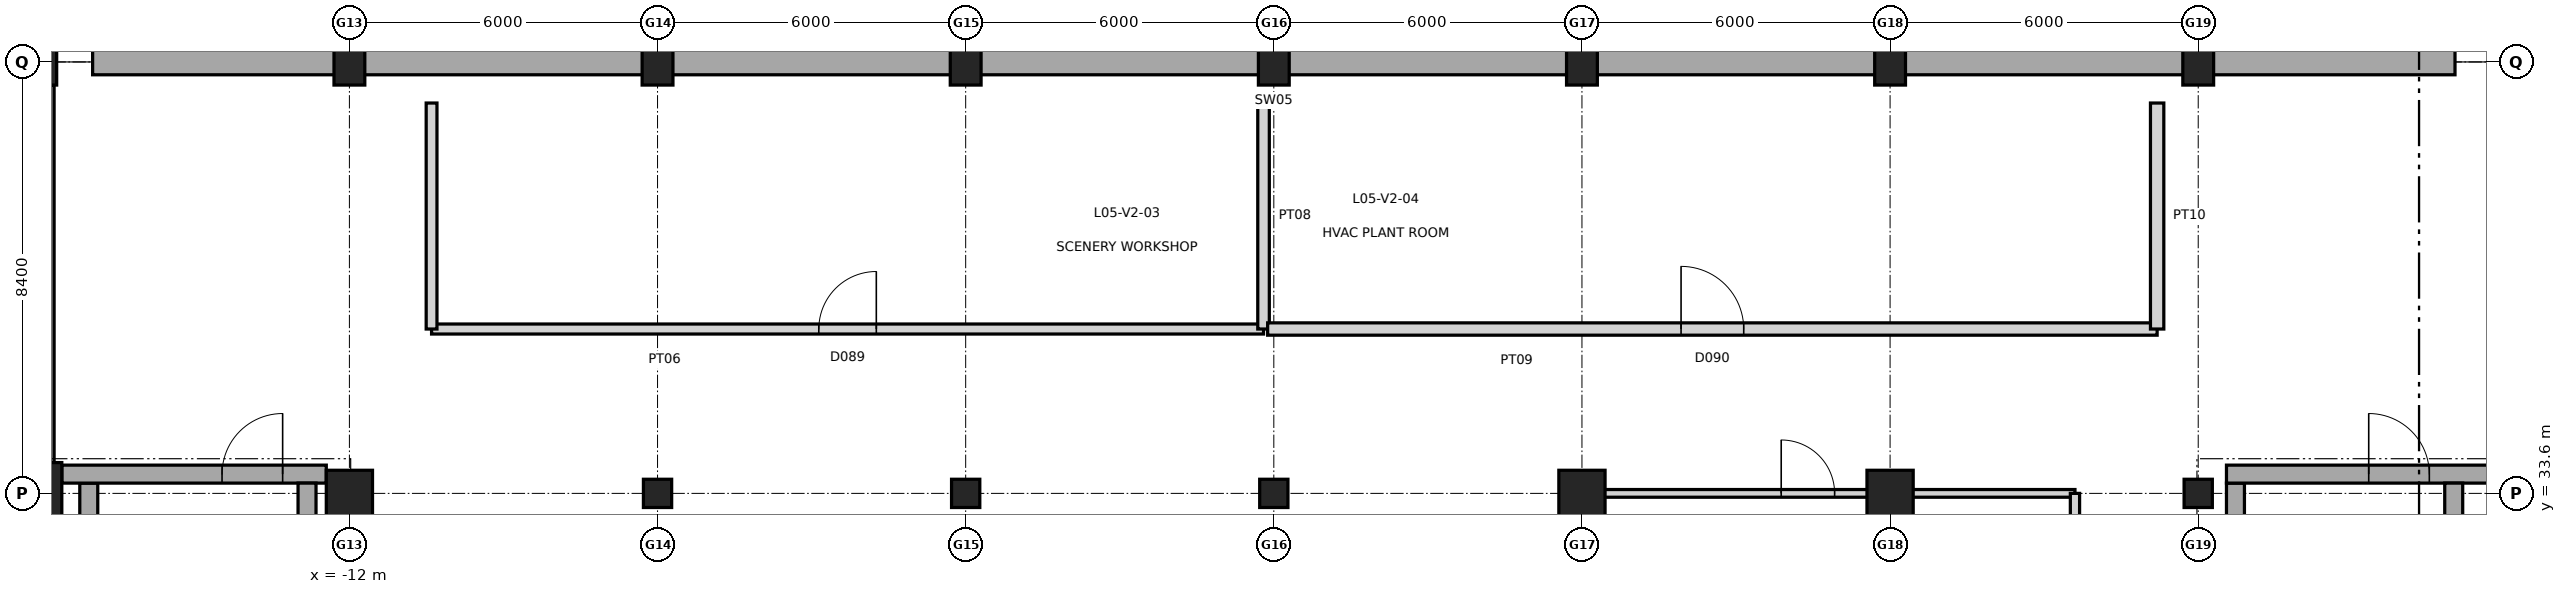
"""IFC4 building model, lengths in metres.
Left out: names, types, materials, properties, quantities, classifications, styles, units other than length and angle.
Written with IfcOpenShell. Run it as: python <this file> out.ifc"""

import sys

from ifc_helpers import new_model, si_unit, direction, frame, frame_2d, origin, origin_2d, place, context, subcontext, project, spatial, rectangle, extrude, element, fill, save


model = new_model("IFC4")
c1 = context("Model", 3, precision=1e-05, world=origin(), true_north=direction((0.0, 1.0)))
c2 = subcontext(c1, "Body", "Model", "MODEL_VIEW")
j1 = project(units=[si_unit("LENGTHUNIT", "METRE"), si_unit("PLANEANGLEUNIT", "RADIAN")], contexts=[c1])
p1 = place(None, origin())
s1 = spatial("IfcSite", under=j1, at=p1, CompositionType="ELEMENT")
p2 = place(p1, origin())
s2 = spatial("IfcBuilding", under=s1, at=p2, CompositionType="ELEMENT")
p3 = place(p2, frame((0.0, 0.0, 24.6)))
s3 = spatial("IfcBuildingStorey", under=s2, at=p3, CompositionType="ELEMENT", Elevation=24.6)
p4 = place(p3, frame((-18.0, 33.6, 0.0), z_axis=(0.0, 0.0, 1.0), x_axis=(1.0, 0.0, 0.0)))
e1 = element("IfcColumn", 1, at=p4, inside=s3, PredefinedType="COLUMN", context=c2, shape_type="SweptSolid", body=[
    extrude(rectangle(XDim=0.8, YDim=1.2, at=origin_2d()), origin(), (0.0, 0.0, 1.0), 5.4),
])
p5 = place(p3, frame((-18.0, 42.0, 0.0), z_axis=(0.0, 0.0, 1.0), x_axis=(1.0, 0.0, 0.0)))
e2 = element("IfcColumn", 2, at=p5, inside=s3, PredefinedType="COLUMN", context=c2, shape_type="SweptSolid", body=[
    extrude(rectangle(XDim=0.6, YDim=0.9, at=origin_2d()), origin(), (0.0, 0.0, 1.0), 5.4),
])
p6 = place(p3, frame((-12.0, 33.6, 0.0), z_axis=(0.0, 0.0, 1.0), x_axis=(1.0, 0.0, 0.0)))
e3 = element("IfcColumn", 3, at=p6, inside=s3, PredefinedType="COLUMN", context=c2, shape_type="SweptSolid", body=[
    extrude(rectangle(XDim=0.9, YDim=0.9, at=origin_2d()), origin(), (0.0, 0.0, 1.0), 5.4),
])
p7 = place(p3, frame((-12.0, 42.0, 0.0), z_axis=(0.0, 0.0, 1.0), x_axis=(1.0, 0.0, 0.0)))
e4 = element("IfcColumn", 4, at=p7, inside=s3, PredefinedType="COLUMN", context=c2, shape_type="SweptSolid", body=[
    extrude(rectangle(XDim=0.6, YDim=0.9, at=origin_2d()), origin(), (0.0, 0.0, 1.0), 5.4),
])
p8 = place(p3, frame((-6.0, 33.6, 0.0), z_axis=(0.0, 0.0, 1.0), x_axis=(1.0, 0.0, 0.0)))
e5 = element("IfcColumn", 5, at=p8, inside=s3, PredefinedType="COLUMN", context=c2, shape_type="SweptSolid", body=[
    extrude(rectangle(XDim=0.55, YDim=0.55, at=origin_2d()), origin(), (0.0, 0.0, 1.0), 5.4),
])
p9 = place(p3, frame((-6.0, 42.0, 0.0), z_axis=(0.0, 0.0, 1.0), x_axis=(1.0, 0.0, 0.0)))
e6 = element("IfcColumn", 6, at=p9, inside=s3, PredefinedType="COLUMN", context=c2, shape_type="SweptSolid", body=[
    extrude(rectangle(XDim=0.6, YDim=0.9, at=origin_2d()), origin(), (0.0, 0.0, 1.0), 5.4),
])
p10 = place(p3, frame((0.0, 33.6, 0.0), z_axis=(0.0, 0.0, 1.0), x_axis=(1.0, 0.0, 0.0)))
e7 = element("IfcColumn", 7, at=p10, inside=s3, PredefinedType="COLUMN", context=c2, shape_type="SweptSolid", body=[
    extrude(rectangle(XDim=0.55, YDim=0.55, at=origin_2d()), origin(), (0.0, 0.0, 1.0), 5.4),
])
p11 = place(p3, frame((0.0, 42.0, 0.0), z_axis=(0.0, 0.0, 1.0), x_axis=(1.0, 0.0, 0.0)))
e8 = element("IfcColumn", 8, at=p11, inside=s3, PredefinedType="COLUMN", context=c2, shape_type="SweptSolid", body=[
    extrude(rectangle(XDim=0.6, YDim=0.9, at=origin_2d()), origin(), (0.0, 0.0, 1.0), 5.4),
])
p12 = place(p3, frame((6.0, 33.6, 0.0), z_axis=(0.0, 0.0, 1.0), x_axis=(1.0, 0.0, 0.0)))
e9 = element("IfcColumn", 9, at=p12, inside=s3, PredefinedType="COLUMN", context=c2, shape_type="SweptSolid", body=[
    extrude(rectangle(XDim=0.55, YDim=0.55, at=origin_2d()), origin(), (0.0, 0.0, 1.0), 5.4),
])
p13 = place(p3, frame((6.0, 42.0, 0.0), z_axis=(0.0, 0.0, 1.0), x_axis=(1.0, 0.0, 0.0)))
e10 = element("IfcColumn", 10, at=p13, inside=s3, PredefinedType="COLUMN", context=c2, shape_type="SweptSolid", body=[
    extrude(rectangle(XDim=0.6, YDim=0.9, at=origin_2d()), origin(), (0.0, 0.0, 1.0), 5.4),
])
p14 = place(p3, frame((12.0, 33.6, 0.0), z_axis=(0.0, 0.0, 1.0), x_axis=(1.0, 0.0, 0.0)))
e11 = element("IfcColumn", 11, at=p14, inside=s3, PredefinedType="COLUMN", context=c2, shape_type="SweptSolid", body=[
    extrude(rectangle(XDim=0.9, YDim=0.9, at=origin_2d()), origin(), (0.0, 0.0, 1.0), 5.4),
])
p15 = place(p3, frame((12.0, 42.0, 0.0), z_axis=(0.0, 0.0, 1.0), x_axis=(1.0, 0.0, 0.0)))
e12 = element("IfcColumn", 12, at=p15, inside=s3, PredefinedType="COLUMN", context=c2, shape_type="SweptSolid", body=[
    extrude(rectangle(XDim=0.6, YDim=0.9, at=origin_2d()), origin(), (0.0, 0.0, 1.0), 5.4),
])
p16 = place(p3, frame((18.0, 33.6, 0.0), z_axis=(0.0, 0.0, 1.0), x_axis=(1.0, 0.0, 0.0)))
e13 = element("IfcColumn", 13, at=p16, inside=s3, PredefinedType="COLUMN", context=c2, shape_type="SweptSolid", body=[
    extrude(rectangle(XDim=0.9, YDim=0.9, at=origin_2d()), origin(), (0.0, 0.0, 1.0), 5.4),
])
p17 = place(p3, frame((18.0, 42.0, 0.0), z_axis=(0.0, 0.0, 1.0), x_axis=(1.0, 0.0, 0.0)))
e14 = element("IfcColumn", 14, at=p17, inside=s3, PredefinedType="COLUMN", context=c2, shape_type="SweptSolid", body=[
    extrude(rectangle(XDim=0.6, YDim=0.9, at=origin_2d()), origin(), (0.0, 0.0, 1.0), 5.4),
])
p18 = place(p3, frame((24.0, 33.6, 0.0), z_axis=(0.0, 0.0, 1.0), x_axis=(1.0, 0.0, 0.0)))
e15 = element("IfcColumn", 15, at=p18, inside=s3, PredefinedType="COLUMN", context=c2, shape_type="SweptSolid", body=[
    extrude(rectangle(XDim=0.55, YDim=0.55, at=origin_2d()), origin(), (0.0, 0.0, 1.0), 5.4),
])
p19 = place(p3, frame((24.0, 42.0, 0.0), z_axis=(0.0, 0.0, 1.0), x_axis=(1.0, 0.0, 0.0)))
e16 = element("IfcColumn", 16, at=p19, inside=s3, PredefinedType="COLUMN", context=c2, shape_type="SweptSolid", body=[
    extrude(rectangle(XDim=0.6, YDim=0.9, at=origin_2d()), origin(), (0.0, 0.0, 1.0), 5.4),
])
p20 = place(p3, frame((-18.0, 18.0, 0.0), z_axis=(0.0, 0.0, 1.0), x_axis=(0.0, 1.0, 0.0)))
e17 = element("IfcWall", 17, at=p20, inside=s3, PredefinedType="SHEAR", context=c2, shape_type="SweptSolid", body=[
    extrude(rectangle(XDim=23.55, YDim=0.5, at=frame_2d((11.775, 0.0))), origin(), (0.0, 0.0, 1.0), 5.4),
])
p21 = place(p3, frame((-17.0, 42.0, 0.0), z_axis=(0.0, 0.0, 1.0), x_axis=(1.0, 0.0, 0.0)))
e18 = element("IfcWall", 18, at=p21, inside=s3, PredefinedType="SHEAR", context=c2, shape_type="SweptSolid", body=[
    extrude(rectangle(XDim=46.0, YDim=0.5, at=frame_2d((23.0, 0.0))), origin(), (0.0, 0.0, 1.0), 5.4),
])
p22 = place(p3, frame((-17.075, 25.5, 0.0), z_axis=(0.0, 0.0, 1.0), x_axis=(0.0, 1.0, 0.0)))
e19 = element("IfcWall", 19, at=p22, inside=s3, PredefinedType="SHEAR", context=c2, shape_type="SweptSolid", body=[
    extrude(rectangle(XDim=8.3, YDim=0.35, at=frame_2d((4.15, 0.0))), origin(), (0.0, 0.0, 1.0), 5.4),
])
p23 = place(p3, frame((-17.6, 33.975, 0.0), z_axis=(0.0, 0.0, 1.0), x_axis=(1.0, 0.0, 0.0)))
e20 = element("IfcWall", 20, at=p23, inside=s3, PredefinedType="SHEAR", context=c2, shape_type="SweptSolid", body=[
    extrude(rectangle(XDim=5.15, YDim=0.35, at=frame_2d((2.575, 0.0))), origin(), (0.0, 0.0, 1.0), 5.4),
])
p24 = place(p23, frame((3.12, 0.0, 0.0)))
e21 = element("IfcOpeningElement", 21, at=p24, cuts=e20, PredefinedType="OPENING", context=c2, shape_type="SweptSolid", body=[
    extrude(rectangle(XDim=1.18, YDim=2.15, at=frame_2d((0.59, 1.075))), frame((0.0, 0.185, 0.0), z_axis=(0.0, -1.0, 0.0), x_axis=(1.0, 0.0, 0.0)), (0.0, 0.0, 1.0), 0.37),
])
for number, where, z_axis, x_axis in (
    (22, (-12.825, 33.8, 0.0), (0.0, 0.0, 1.0), (0.0, -1.0, 0.0)),
    (23, (24.725, 25.5, 0.0), (0.0, 0.0, 1.0), (0.0, 1.0, 0.0)),
):
    element("IfcWall", number, at=place(p3, frame(where, z_axis=z_axis, x_axis=x_axis)), inside=s3, PredefinedType="SHEAR", context=c2, shape_type="SweptSolid", body=[
        extrude(rectangle(XDim=8.3, YDim=0.35, at=frame_2d((4.15, 0.0))), origin(), (0.0, 0.0, 1.0), 5.4),
    ])
p25 = place(p3, frame((24.55, 33.975, 0.0), z_axis=(0.0, 0.0, 1.0), x_axis=(1.0, 0.0, 0.0)))
e24 = element("IfcWall", 24, at=p25, inside=s3, PredefinedType="SHEAR", context=c2, shape_type="SweptSolid", body=[
    extrude(rectangle(XDim=5.15, YDim=0.35, at=frame_2d((2.575, 0.0))), origin(), (0.0, 0.0, 1.0), 5.4),
])
p26 = place(p25, frame((2.77, 0.0, 0.0)))
e25 = element("IfcOpeningElement", 25, at=p26, cuts=e24, PredefinedType="OPENING", context=c2, shape_type="SweptSolid", body=[
    extrude(rectangle(XDim=1.18, YDim=2.15, at=frame_2d((0.59, 1.075))), frame((0.0, 0.185, 0.0), z_axis=(0.0, -1.0, 0.0), x_axis=(1.0, 0.0, 0.0)), (0.0, 0.0, 1.0), 0.37),
])
p27 = place(p3, frame((28.975, 33.8, 0.0), z_axis=(0.0, 0.0, 1.0), x_axis=(0.0, -1.0, 0.0)))
e26 = element("IfcWall", 26, at=p27, inside=s3, PredefinedType="SHEAR", context=c2, shape_type="SweptSolid", body=[
    extrude(rectangle(XDim=8.3, YDim=0.35, at=frame_2d((4.15, 0.0))), origin(), (0.0, 0.0, 1.0), 5.4),
])
p28 = place(p3, frame((12.0, 33.6, 0.0), z_axis=(0.0, 0.0, 1.0), x_axis=(1.0, 0.0, 0.0)))
e27 = element("IfcWall", 27, at=p28, inside=s3, PredefinedType="PARTITIONING", context=c2, shape_type="SweptSolid", body=[
    extrude(rectangle(XDim=9.6, YDim=0.15, at=frame_2d((4.8, 0.0))), origin(), (0.0, 0.0, 1.0), 4.412),
])
p29 = place(p28, frame((3.88, 0.0, 0.0)))
e28 = element("IfcOpeningElement", 28, at=p29, cuts=e27, PredefinedType="OPENING", context=c2, shape_type="SweptSolid", body=[
    extrude(rectangle(XDim=1.04, YDim=2.2, at=frame_2d((0.52, 1.1))), frame((0.0, 0.085, 0.0), z_axis=(0.0, -1.0, 0.0), x_axis=(1.0, 0.0, 0.0)), (0.0, 0.0, 1.0), 0.17),
])
p30 = place(p3, frame((12.0, 24.2, 0.0), z_axis=(0.0, 0.0, 1.0), x_axis=(0.0, 1.0, 0.0)))
e29 = element("IfcWall", 29, at=p30, inside=s3, PredefinedType="PARTITIONING", context=c2, shape_type="SweptSolid", body=[
    extrude(rectangle(XDim=9.4, YDim=0.165, at=frame_2d((4.7, 0.0))), origin(), (0.0, 0.0, 1.0), 4.19),
])
p31 = place(p3, frame((21.6, 24.2, 0.0), z_axis=(0.0, 0.0, 1.0), x_axis=(0.0, 1.0, 0.0)))
e30 = element("IfcWall", 30, at=p31, inside=s3, PredefinedType="PARTITIONING", context=c2, shape_type="SweptSolid", body=[
    extrude(rectangle(XDim=9.4, YDim=0.18, at=frame_2d((4.7, 0.0))), origin(), (0.0, 0.0, 1.0), 5.02),
])
p32 = place(p3, frame((-10.4, 36.8, 0.0), z_axis=(0.0, 0.0, 1.0), x_axis=(1.0, 0.0, 0.0)))
e31 = element("IfcWall", 31, at=p32, inside=s3, PredefinedType="PARTITIONING", context=c2, shape_type="SweptSolid", body=[
    extrude(rectangle(XDim=16.2, YDim=0.195, at=frame_2d((8.1, 0.0))), origin(), (0.0, 0.0, 1.0), 5.02),
])
p33 = place(p32, frame((7.54, 0.0, 0.0)))
e32 = element("IfcOpeningElement", 32, at=p33, cuts=e31, PredefinedType="OPENING", context=c2, shape_type="SweptSolid", body=[
    extrude(rectangle(XDim=1.12, YDim=2.25, at=frame_2d((0.56, 1.125))), frame((0.0, 0.107, 0.0), z_axis=(0.0, -1.0, 0.0), x_axis=(1.0, 0.0, 0.0)), (0.0, 0.0, 1.0), 0.215),
])
p34 = place(p3, frame((-10.4, 36.8, 0.0), z_axis=(0.0, 0.0, 1.0), x_axis=(0.0, 1.0, 0.0)))
e33 = element("IfcWall", 33, at=p34, inside=s3, PredefinedType="PARTITIONING", context=c2, shape_type="SweptSolid", body=[
    extrude(rectangle(XDim=4.4, YDim=0.21, at=frame_2d((2.2, 0.0))), origin(), (0.0, 0.0, 1.0), 5.02),
])
p35 = place(p3, frame((5.8, 36.8, 0.0), z_axis=(0.0, 0.0, 1.0), x_axis=(0.0, 1.0, 0.0)))
e34 = element("IfcWall", 34, at=p35, inside=s3, PredefinedType="PARTITIONING", context=c2, shape_type="SweptSolid", body=[
    extrude(rectangle(XDim=4.4, YDim=0.225, at=frame_2d((2.2, 0.0))), origin(), (0.0, 0.0, 1.0), 4.334),
])
p36 = place(p3, frame((5.88, 36.8, 0.0), z_axis=(0.0, 0.0, 1.0), x_axis=(1.0, 0.0, 0.0)))
e35 = element("IfcWall", 35, at=p36, inside=s3, PredefinedType="PARTITIONING", context=c2, shape_type="SweptSolid", body=[
    extrude(rectangle(XDim=17.32, YDim=0.24, at=frame_2d((8.66, 0.0))), origin(), (0.0, 0.0, 1.0), 5.02),
])
p37 = place(p36, frame((8.05, 0.0, 0.0)))
e36 = element("IfcOpeningElement", 36, at=p37, cuts=e35, PredefinedType="OPENING", context=c2, shape_type="SweptSolid", body=[
    extrude(rectangle(XDim=1.22, YDim=2.3, at=frame_2d((0.61, 1.15))), frame((0.0, 0.13, 0.0), z_axis=(0.0, -1.0, 0.0), x_axis=(1.0, 0.0, 0.0)), (0.0, 0.0, 1.0), 0.26),
])
p38 = place(p3, frame((23.2, 36.8, 0.0), z_axis=(0.0, 0.0, 1.0), x_axis=(0.0, 1.0, 0.0)))
e37 = element("IfcWall", 37, at=p38, inside=s3, PredefinedType="PARTITIONING", context=c2, shape_type="SweptSolid", body=[
    extrude(rectangle(XDim=4.4, YDim=0.26, at=frame_2d((2.2, 0.0))), origin(), (0.0, 0.0, 1.0), 5.02),
])
p39 = place(p24, origin())
e38 = element("IfcDoor", 38, at=p39, inside=s3, OperationType="SINGLE_SWING_RIGHT", PredefinedType="DOOR", context=c2, shape_type="SweptSolid", body=[
    extrude(rectangle(XDim=1.18, YDim=2.15, at=frame_2d((0.59, 1.075))), frame((0.0, 0.025, 0.0), z_axis=(0.0, -1.0, 0.0), x_axis=(1.0, 0.0, 0.0)), (0.0, 0.0, 1.0), 0.05),
])
fill(e21, e38)
p40 = place(p26, origin())
e39 = element("IfcDoor", 39, at=p40, inside=s3, OperationType="SINGLE_SWING_LEFT", PredefinedType="DOOR", context=c2, shape_type="SweptSolid", body=[
    extrude(rectangle(XDim=1.18, YDim=2.15, at=frame_2d((0.59, 1.075))), frame((0.0, 0.025, 0.0), z_axis=(0.0, -1.0, 0.0), x_axis=(1.0, 0.0, 0.0)), (0.0, 0.0, 1.0), 0.05),
])
fill(e25, e39)
p41 = place(p29, origin())
e40 = element("IfcDoor", 40, at=p41, inside=s3, OperationType="SINGLE_SWING_LEFT", PredefinedType="DOOR", context=c2, shape_type="SweptSolid", body=[
    extrude(rectangle(XDim=1.04, YDim=2.2, at=frame_2d((0.52, 1.1))), frame((0.0, 0.025, 0.0), z_axis=(0.0, -1.0, 0.0), x_axis=(1.0, 0.0, 0.0)), (0.0, 0.0, 1.0), 0.05),
])
fill(e28, e40)
p42 = place(p33, origin())
e41 = element("IfcDoor", 41, at=p42, inside=s3, OperationType="SINGLE_SWING_RIGHT", PredefinedType="DOOR", context=c2, shape_type="SweptSolid", body=[
    extrude(rectangle(XDim=1.12, YDim=2.25, at=frame_2d((0.56, 1.125))), frame((0.0, 0.025, 0.0), z_axis=(0.0, -1.0, 0.0), x_axis=(1.0, 0.0, 0.0)), (0.0, 0.0, 1.0), 0.05),
])
fill(e32, e41)
p43 = place(p37, origin())
e42 = element("IfcDoor", 42, at=p43, inside=s3, OperationType="SINGLE_SWING_LEFT", PredefinedType="DOOR", context=c2, shape_type="SweptSolid", body=[
    extrude(rectangle(XDim=1.22, YDim=2.3, at=frame_2d((0.61, 1.15))), frame((0.0, 0.025, 0.0), z_axis=(0.0, -1.0, 0.0), x_axis=(1.0, 0.0, 0.0)), (0.0, 0.0, 1.0), 0.05),
])
fill(e36, e42)
save(model, sys.argv[1])
